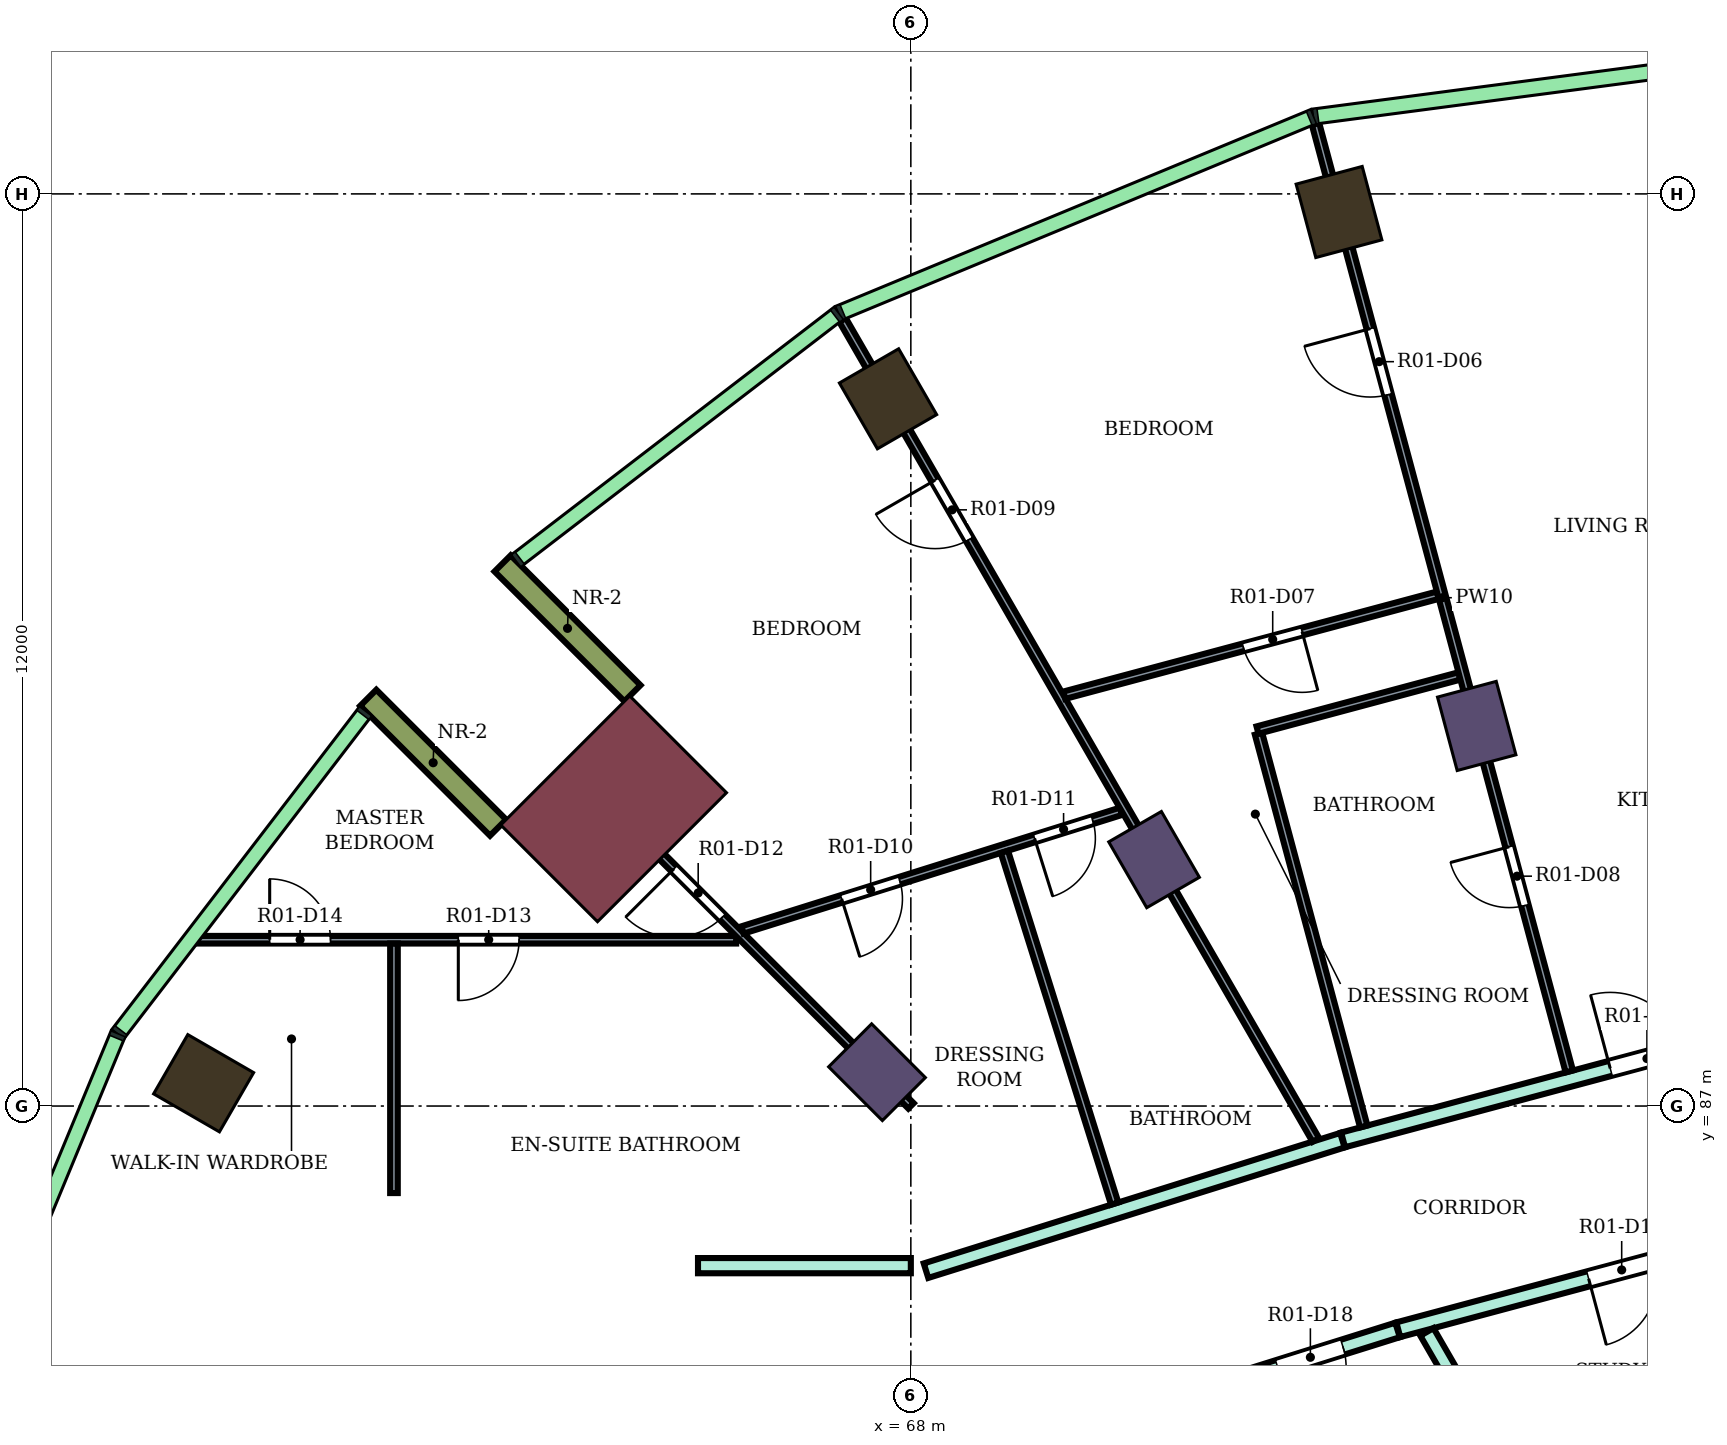
"""IFC4 building model, lengths in metres.
Left out: names, types, materials, properties, quantities, classifications, styles, units other than length and angle.
Written with IfcOpenShell. Run it as: python <this file> out.ifc"""

import sys

from ifc_helpers import new_model, si_unit, direction, frame, frame_2d, origin, origin_2d, place, context, subcontext, project, spatial, rectangle, extrude, element, fill, save


model = new_model("IFC4")
c1 = context("Model", 3, precision=1e-05, world=origin(), true_north=direction((0.0, 1.0)))
c2 = subcontext(c1, "Body", "Model", "MODEL_VIEW")
j1 = project(units=[si_unit("LENGTHUNIT", "METRE"), si_unit("PLANEANGLEUNIT", "RADIAN")], contexts=[c1])
p1 = place(None, origin())
s1 = spatial("IfcSite", under=j1, at=p1, CompositionType="ELEMENT")
p2 = place(p1, origin())
s2 = spatial("IfcBuilding", under=s1, at=p2, CompositionType="ELEMENT")
p3 = place(p2, frame((0.0, 0.0, 161.8)))
s3 = spatial("IfcBuildingStorey", under=s2, at=p3, CompositionType="ELEMENT", Elevation=161.8)
for number, where, z_axis, x_axis in (
    (1, (73.633, 98.762, 0.0), (0.0, 0.0, 1.0), (-0.259, 0.966, 0.0)),
    (2, (67.7, 96.304, 0.0), (0.0, 0.0, 1.0), (-0.5, 0.866, 0.0)),
    (3, (58.696, 87.3, 0.0), (0.0, 0.0, 1.0), (-0.866, 0.5, 0.0)),
):
    element("IfcColumn", number, at=place(p3, frame(where, z_axis=z_axis, x_axis=x_axis)), inside=s3, PredefinedType="COLUMN", context=c2, shape_type="SweptSolid", body=[
        extrude(rectangle(XDim=1.0, YDim=0.9, at=origin_2d()), origin(), (0.0, 0.0, 1.0), 4.1),
    ])
for number, where, z_axis, x_axis in (
    (4, (75.445, 92.0, 0.0), (0.0, 0.0, 1.0), (-0.259, 0.966, 0.0)),
    (5, (71.2, 90.242, 0.0), (0.0, 0.0, 1.0), (-0.5, 0.866, 0.0)),
    (6, (67.555, 87.445, 0.0), (0.0, 0.0, 1.0), (-0.707, 0.707, 0.0)),
):
    element("IfcColumn", number, at=place(p3, frame(where, z_axis=z_axis, x_axis=x_axis)), inside=s3, PredefinedType="COLUMN", context=c2, shape_type="SweptSolid", body=[
        extrude(rectangle(XDim=1.0, YDim=0.8, at=origin_2d()), origin(), (0.0, 0.0, 1.0), 4.1),
    ])
p4 = place(p3, frame((64.09, 90.91, 0.0), z_axis=(0.0, 0.0, 1.0), x_axis=(-0.707106781187, 0.707106781187, 0.0)))
e7 = element("IfcColumn", 7, at=p4, inside=s3, PredefinedType="COLUMN", context=c2, shape_type="SweptSolid", body=[
    extrude(rectangle(XDim=1.8, YDim=2.4, at=origin_2d()), origin(), (0.0, 0.0, 1.0), 4.1),
])
for number, where, z_axis, x_axis in (
    (8, (64.338, 92.43, 0.0), (0.0, 0.0, 1.0), (-0.707, 0.707, 0.0)),
    (9, (62.57, 90.662, 0.0), (0.0, 0.0, 1.0), (-0.707, 0.707, 0.0)),
):
    element("IfcWall", number, at=place(p3, frame(where, z_axis=z_axis, x_axis=x_axis)), inside=s3, PredefinedType="NOTDEFINED", context=c2, shape_type="SweptSolid", body=[
        extrude(rectangle(XDim=2.416, YDim=0.3, at=frame_2d((1.208, 0.0))), origin(), (0.0, 0.0, 1.0), 4.1),
    ])
p5 = place(p3, frame((65.2, 84.9, 0.0), z_axis=(0.0, 0.0, 1.0), x_axis=(1.0, 0.0, 0.0)))
e10 = element("IfcWall", 10, at=p5, inside=s3, PredefinedType="PARTITIONING", context=c2, shape_type="SweptSolid", body=[
    extrude(rectangle(XDim=2.8, YDim=0.2, at=frame_2d((1.4, 0.0))), origin(), (0.0, 0.0, 1.0), 3.65),
])
p6 = place(p3, frame((68.2, 84.834, 0.0), z_axis=(0.0, 0.0, 1.0), x_axis=(0.954272398161, 0.298938438661, 0.0)))
e11 = element("IfcWall", 11, at=p6, inside=s3, PredefinedType="PARTITIONING", context=c2, shape_type="SweptSolid", body=[
    extrude(rectangle(XDim=5.74, YDim=0.2, at=frame_2d((2.87, 0.0))), origin(), (0.0, 0.0, 1.0), 3.65),
])
p7 = place(p3, frame((72.1, 83.332, 0.0), z_axis=(0.0, 0.0, 1.0), x_axis=(0.954233106619, 0.299063836383, 0.0)))
e12 = element("IfcWall", 12, at=p7, inside=s3, PredefinedType="PARTITIONING", context=c2, shape_type="SweptSolid", body=[
    extrude(rectangle(XDim=2.414, YDim=0.2, at=frame_2d((1.207, 0.0))), origin(), (0.0, 0.0, 1.0), 3.65),
])
p8 = place(p7, frame((0.762, 0.0, 0.0)))
e13 = element("IfcOpeningElement", 13, at=p8, cuts=e12, PredefinedType="OPENING", context=c2, shape_type="SweptSolid", body=[
    extrude(rectangle(XDim=0.9, YDim=2.1, at=frame_2d((0.45, 1.05))), frame((0.0, 0.11, 0.0), z_axis=(0.0, -1.0, 0.0), x_axis=(1.0, 0.0, 0.0)), (0.0, 0.0, 1.0), 0.22),
])
p9 = place(p3, frame((73.687, 86.554, 0.0), z_axis=(0.0, 0.0, 1.0), x_axis=(0.965999420828, 0.258544230182, 0.0)))
e14 = element("IfcWall", 14, at=p9, inside=s3, PredefinedType="PARTITIONING", context=c2, shape_type="SweptSolid", body=[
    extrude(rectangle(XDim=6.446, YDim=0.2, at=frame_2d((3.223, 0.0))), origin(), (0.0, 0.0, 1.0), 3.65),
])
p10 = place(p9, frame((3.638, 0.0, 0.0)))
e15 = element("IfcOpeningElement", 15, at=p10, cuts=e14, PredefinedType="OPENING", context=c2, shape_type="SweptSolid", body=[
    extrude(rectangle(XDim=1.0, YDim=2.1, at=frame_2d((0.5, 1.05))), frame((0.0, 0.11, 0.0), z_axis=(0.0, -1.0, 0.0), x_axis=(1.0, 0.0, 0.0)), (0.0, 0.0, 1.0), 0.22),
])
p11 = place(p3, frame((74.413, 84.057, 0.0), z_axis=(0.0, 0.0, 1.0), x_axis=(0.965972135939, 0.258646153246, 0.0)))
e16 = element("IfcWall", 16, at=p11, inside=s3, PredefinedType="PARTITIONING", context=c2, shape_type="SweptSolid", body=[
    extrude(rectangle(XDim=5.654, YDim=0.2, at=frame_2d((2.827, 0.0))), origin(), (0.0, 0.0, 1.0), 3.65),
])
p12 = place(p11, frame((2.593, 0.0, 0.0)))
e17 = element("IfcOpeningElement", 17, at=p12, cuts=e16, PredefinedType="OPENING", context=c2, shape_type="SweptSolid", body=[
    extrude(rectangle(XDim=0.9, YDim=2.1, at=frame_2d((0.45, 1.05))), frame((0.0, 0.11, 0.0), z_axis=(0.0, -1.0, 0.0), x_axis=(1.0, 0.0, 0.0)), (0.0, 0.0, 1.0), 0.22),
])
p13 = place(p3, frame((74.79, 84.028, 0.0), z_axis=(0.0, 0.0, 1.0), x_axis=(0.499905962189, -0.866079689733, 0.0)))
e18 = element("IfcWall", 18, at=p13, inside=s3, PredefinedType="PARTITIONING", context=c2, shape_type="SweptSolid", body=[
    extrude(rectangle(XDim=2.726, YDim=0.2, at=frame_2d((1.363, 0.0))), origin(), (0.0, 0.0, 1.0), 3.65),
])
p14 = place(p3, frame((58.6, 89.188, 0.0), z_axis=(0.0, 0.0, 1.0), x_axis=(1.0, 0.0, 0.0)))
e19 = element("IfcWall", 19, at=p14, inside=s3, PredefinedType="PARTITIONING", context=c2, shape_type="SweptSolid", body=[
    extrude(rectangle(XDim=7.102, YDim=0.1, at=frame_2d((3.551, 0.0))), origin(), (0.0, 0.0, 1.0), 3.65),
])
p15 = place(p14, frame((3.447, 0.0, 0.0)))
e20 = element("IfcOpeningElement", 20, at=p15, cuts=e19, PredefinedType="OPENING", context=c2, shape_type="SweptSolid", body=[
    extrude(rectangle(XDim=0.8, YDim=2.1, at=frame_2d((0.4, 1.05))), frame((0.0, 0.06, 0.0), z_axis=(0.0, -1.0, 0.0), x_axis=(1.0, 0.0, 0.0)), (0.0, 0.0, 1.0), 0.12),
])
p16 = place(p14, frame((0.965, 0.0, 0.0)))
e21 = element("IfcOpeningElement", 21, at=p16, cuts=e19, PredefinedType="OPENING", context=c2, shape_type="SweptSolid", body=[
    extrude(rectangle(XDim=0.8, YDim=2.1, at=frame_2d((0.4, 1.05))), frame((0.0, 0.06, 0.0), z_axis=(0.0, -1.0, 0.0), x_axis=(1.0, 0.0, 0.0)), (0.0, 0.0, 1.0), 0.12),
])
p17 = place(p3, frame((61.2, 85.855, 0.0), z_axis=(0.0, 0.0, 1.0), x_axis=(0.0, 1.0, 0.0)))
e22 = element("IfcWall", 22, at=p17, inside=s3, PredefinedType="PARTITIONING", context=c2, shape_type="SweptSolid", body=[
    extrude(rectangle(XDim=3.283, YDim=0.1, at=frame_2d((1.642, 0.0))), origin(), (0.0, 0.0, 1.0), 3.65),
])
p18 = place(p3, frame((63.598, 91.408, 0.0), z_axis=(0.0, 0.0, 1.0), x_axis=(0.70693039891, -0.707283119477, 0.0)))
e23 = element("IfcWall", 23, at=p18, inside=s3, PredefinedType="PARTITIONING", context=c2, shape_type="SweptSolid", body=[
    extrude(rectangle(XDim=6.229, YDim=0.1, at=frame_2d((3.115, 0.0))), origin(), (0.0, 0.0, 1.0), 3.65),
])
p19 = place(p18, frame((1.819, 0.0, 0.0)))
e24 = element("IfcOpeningElement", 24, at=p19, cuts=e23, PredefinedType="OPENING", context=c2, shape_type="SweptSolid", body=[
    extrude(rectangle(XDim=0.9, YDim=2.1, at=frame_2d((0.45, 1.05))), frame((0.0, 0.06, 0.0), z_axis=(0.0, -1.0, 0.0), x_axis=(1.0, 0.0, 0.0)), (0.0, 0.0, 1.0), 0.12),
])
p20 = place(p3, frame((65.785, 89.316, 0.0), z_axis=(0.0, 0.0, 1.0), x_axis=(0.954187348418, 0.299209799504, 0.0)))
e25 = element("IfcWall", 25, at=p20, inside=s3, PredefinedType="PARTITIONING", context=c2, shape_type="SweptSolid", body=[
    extrude(rectangle(XDim=5.219, YDim=0.1, at=frame_2d((2.609, 0.0))), origin(), (0.0, 0.0, 1.0), 3.65),
])
p21 = place(p20, frame((1.367, 0.0, 0.0)))
e26 = element("IfcOpeningElement", 26, at=p21, cuts=e25, PredefinedType="OPENING", context=c2, shape_type="SweptSolid", body=[
    extrude(rectangle(XDim=0.8, YDim=2.1, at=frame_2d((0.4, 1.05))), frame((0.0, 0.06, 0.0), z_axis=(0.0, -1.0, 0.0), x_axis=(1.0, 0.0, 0.0)), (0.0, 0.0, 1.0), 0.12),
])
p22 = place(p20, frame((4.027, 0.0, 0.0)))
e27 = element("IfcOpeningElement", 27, at=p22, cuts=e25, PredefinedType="OPENING", context=c2, shape_type="SweptSolid", body=[
    extrude(rectangle(XDim=0.8, YDim=2.1, at=frame_2d((0.4, 1.05))), frame((0.0, 0.06, 0.0), z_axis=(0.0, -1.0, 0.0), x_axis=(1.0, 0.0, 0.0)), (0.0, 0.0, 1.0), 0.12),
])
p23 = place(p3, frame((67.101, 97.342, 0.0), z_axis=(0.0, 0.0, 1.0), x_axis=(0.499929451451, -0.866066131177, 0.0)))
e28 = element("IfcWall", 28, at=p23, inside=s3, PredefinedType="PARTITIONING", context=c2, shape_type="SweptSolid", body=[
    extrude(rectangle(XDim=12.456, YDim=0.1, at=frame_2d((6.228, 0.0))), origin(), (0.0, 0.0, 1.0), 3.65),
])
p24 = place(p23, frame((2.434, 0.0, 0.0)))
e29 = element("IfcOpeningElement", 29, at=p24, cuts=e28, PredefinedType="OPENING", context=c2, shape_type="SweptSolid", body=[
    extrude(rectangle(XDim=0.9, YDim=2.1, at=frame_2d((0.45, 1.05))), frame((0.0, 0.06, 0.0), z_axis=(0.0, -1.0, 0.0), x_axis=(1.0, 0.0, 0.0)), (0.0, 0.0, 1.0), 0.12),
])
p25 = place(p3, frame((69.231, 90.344, 0.0), z_axis=(0.0, 0.0, 1.0), x_axis=(0.299203490128, -0.954189326861, 0.0)))
e30 = element("IfcWall", 30, at=p25, inside=s3, PredefinedType="PARTITIONING", context=c2, shape_type="SweptSolid", body=[
    extrude(rectangle(XDim=4.85, YDim=0.1, at=frame_2d((2.425, 0.0))), origin(), (0.0, 0.0, 1.0), 3.65),
])
p26 = place(p3, frame((70.019, 92.405, 0.0), z_axis=(0.0, 0.0, 1.0), x_axis=(0.965982744428, 0.258606530209, 0.0)))
e31 = element("IfcWall", 31, at=p26, inside=s3, PredefinedType="PARTITIONING", context=c2, shape_type="SweptSolid", body=[
    extrude(rectangle(XDim=5.087, YDim=0.1, at=frame_2d((2.543, 0.0))), origin(), (0.0, 0.0, 1.0), 3.65),
])
p27 = place(p26, frame((2.438, 0.0, 0.0)))
e32 = element("IfcOpeningElement", 32, at=p27, cuts=e31, PredefinedType="OPENING", context=c2, shape_type="SweptSolid", body=[
    extrude(rectangle(XDim=0.8, YDim=2.1, at=frame_2d((0.4, 1.05))), frame((0.0, 0.06, 0.0), z_axis=(0.0, -1.0, 0.0), x_axis=(1.0, 0.0, 0.0)), (0.0, 0.0, 1.0), 0.12),
])
p28 = place(p3, frame((72.574, 91.898, 0.0), z_axis=(0.0, 0.0, 1.0), x_axis=(0.258739127054, -0.965947236722, 0.0)))
e33 = element("IfcWall", 33, at=p28, inside=s3, PredefinedType="PARTITIONING", context=c2, shape_type="SweptSolid", body=[
    extrude(rectangle(XDim=5.349, YDim=0.1, at=frame_2d((2.675, 0.0))), origin(), (0.0, 0.0, 1.0), 3.65),
])
p29 = place(p3, frame((72.561, 91.946, 0.0), z_axis=(0.0, 0.0, 1.0), x_axis=(0.96591000446, 0.258878085754, 0.0)))
e34 = element("IfcWall", 34, at=p29, inside=s3, PredefinedType="PARTITIONING", context=c2, shape_type="SweptSolid", body=[
    extrude(rectangle(XDim=2.75, YDim=0.1, at=frame_2d((1.375, 0.0))), origin(), (0.0, 0.0, 1.0), 3.65),
])
p30 = place(p3, frame((73.324, 99.92, 0.0), z_axis=(0.0, 0.0, 1.0), x_axis=(0.258710550884, -0.965954890697, 0.0)))
e35 = element("IfcWall", 35, at=p30, inside=s3, PredefinedType="PARTITIONING", context=c2, shape_type="SweptSolid", body=[
    extrude(rectangle(XDim=12.904, YDim=0.1, at=frame_2d((6.452, 0.0))), origin(), (0.0, 0.0, 1.0), 3.65),
])
p31 = place(p30, frame((2.787, 0.0, 0.0)))
e36 = element("IfcOpeningElement", 36, at=p31, cuts=e35, PredefinedType="OPENING", context=c2, shape_type="SweptSolid", body=[
    extrude(rectangle(XDim=0.9, YDim=2.1, at=frame_2d((0.45, 1.05))), frame((0.0, 0.06, 0.0), z_axis=(0.0, -1.0, 0.0), x_axis=(1.0, 0.0, 0.0)), (0.0, 0.0, 1.0), 0.12),
])
p32 = place(p30, frame((9.844, 0.0, 0.0)))
e37 = element("IfcOpeningElement", 37, at=p32, cuts=e35, PredefinedType="OPENING", context=c2, shape_type="SweptSolid", body=[
    extrude(rectangle(XDim=0.8, YDim=2.1, at=frame_2d((0.4, 1.05))), frame((0.0, 0.06, 0.0), z_axis=(0.0, -1.0, 0.0), x_axis=(1.0, 0.0, 0.0)), (0.0, 0.0, 1.0), 0.12),
])
p33 = place(p10, origin())
e38 = element("IfcDoor", 38, at=p33, inside=s3, OperationType="SINGLE_SWING_LEFT", PredefinedType="DOOR", context=c2, shape_type="SweptSolid", body=[
    extrude(rectangle(XDim=1.0, YDim=2.1, at=frame_2d((0.5, 1.05))), frame((0.0, 0.025, 0.0), z_axis=(0.0, -1.0, 0.0), x_axis=(1.0, 0.0, 0.0)), (0.0, 0.0, 1.0), 0.05),
])
fill(e15, e38)
p34 = place(p31, frame((0.9, 0.0, 0.0), z_axis=(0.0, 0.0, 1.0), x_axis=(-1.0, 0.0, 0.0)))
e39 = element("IfcDoor", 39, at=p34, inside=s3, OperationType="SINGLE_SWING_RIGHT", PredefinedType="DOOR", context=c2, shape_type="SweptSolid", body=[
    extrude(rectangle(XDim=0.9, YDim=2.1, at=frame_2d((0.45, 1.05))), frame((0.0, 0.025, 0.0), z_axis=(0.0, -1.0, 0.0), x_axis=(1.0, 0.0, 0.0)), (0.0, 0.0, 1.0), 0.05),
])
fill(e36, e39)
p35 = place(p27, frame((0.8, 0.0, 0.0), z_axis=(0.0, 0.0, 1.0), x_axis=(-1.0, 0.0, 0.0)))
e40 = element("IfcDoor", 40, at=p35, inside=s3, OperationType="SINGLE_SWING_LEFT", PredefinedType="DOOR", context=c2, shape_type="SweptSolid", body=[
    extrude(rectangle(XDim=0.8, YDim=2.1, at=frame_2d((0.4, 1.05))), frame((0.0, 0.025, 0.0), z_axis=(0.0, -1.0, 0.0), x_axis=(1.0, 0.0, 0.0)), (0.0, 0.0, 1.0), 0.05),
])
fill(e32, e40)
p36 = place(p32, frame((0.8, 0.0, 0.0), z_axis=(0.0, 0.0, 1.0), x_axis=(-1.0, 0.0, 0.0)))
e41 = element("IfcDoor", 41, at=p36, inside=s3, OperationType="SINGLE_SWING_RIGHT", PredefinedType="DOOR", context=c2, shape_type="SweptSolid", body=[
    extrude(rectangle(XDim=0.8, YDim=2.1, at=frame_2d((0.4, 1.05))), frame((0.0, 0.025, 0.0), z_axis=(0.0, -1.0, 0.0), x_axis=(1.0, 0.0, 0.0)), (0.0, 0.0, 1.0), 0.05),
])
fill(e37, e41)
p37 = place(p24, frame((0.9, 0.0, 0.0), z_axis=(0.0, 0.0, 1.0), x_axis=(-1.0, 0.0, 0.0)))
e42 = element("IfcDoor", 42, at=p37, inside=s3, OperationType="SINGLE_SWING_RIGHT", PredefinedType="DOOR", context=c2, shape_type="SweptSolid", body=[
    extrude(rectangle(XDim=0.9, YDim=2.1, at=frame_2d((0.45, 1.05))), frame((0.0, 0.025, 0.0), z_axis=(0.0, -1.0, 0.0), x_axis=(1.0, 0.0, 0.0)), (0.0, 0.0, 1.0), 0.05),
])
fill(e29, e42)
p38 = place(p21, frame((0.8, 0.0, 0.0), z_axis=(0.0, 0.0, 1.0), x_axis=(-1.0, 0.0, 0.0)))
e43 = element("IfcDoor", 43, at=p38, inside=s3, OperationType="SINGLE_SWING_RIGHT", PredefinedType="DOOR", context=c2, shape_type="SweptSolid", body=[
    extrude(rectangle(XDim=0.8, YDim=2.1, at=frame_2d((0.4, 1.05))), frame((0.0, 0.025, 0.0), z_axis=(0.0, -1.0, 0.0), x_axis=(1.0, 0.0, 0.0)), (0.0, 0.0, 1.0), 0.05),
])
fill(e26, e43)
p39 = place(p22, frame((0.8, 0.0, 0.0), z_axis=(0.0, 0.0, 1.0), x_axis=(-1.0, 0.0, 0.0)))
e44 = element("IfcDoor", 44, at=p39, inside=s3, OperationType="SINGLE_SWING_RIGHT", PredefinedType="DOOR", context=c2, shape_type="SweptSolid", body=[
    extrude(rectangle(XDim=0.8, YDim=2.1, at=frame_2d((0.4, 1.05))), frame((0.0, 0.025, 0.0), z_axis=(0.0, -1.0, 0.0), x_axis=(1.0, 0.0, 0.0)), (0.0, 0.0, 1.0), 0.05),
])
fill(e27, e44)
p40 = place(p19, frame((0.9, 0.0, 0.0), z_axis=(0.0, 0.0, 1.0), x_axis=(-1.0, 0.0, 0.0)))
e45 = element("IfcDoor", 45, at=p40, inside=s3, OperationType="SINGLE_SWING_RIGHT", PredefinedType="DOOR", context=c2, shape_type="SweptSolid", body=[
    extrude(rectangle(XDim=0.9, YDim=2.1, at=frame_2d((0.45, 1.05))), frame((0.0, 0.025, 0.0), z_axis=(0.0, -1.0, 0.0), x_axis=(1.0, 0.0, 0.0)), (0.0, 0.0, 1.0), 0.05),
])
fill(e24, e45)
p41 = place(p15, frame((0.8, 0.0, 0.0), z_axis=(0.0, 0.0, 1.0), x_axis=(-1.0, 0.0, 0.0)))
e46 = element("IfcDoor", 46, at=p41, inside=s3, OperationType="SINGLE_SWING_RIGHT", PredefinedType="DOOR", context=c2, shape_type="SweptSolid", body=[
    extrude(rectangle(XDim=0.8, YDim=2.1, at=frame_2d((0.4, 1.05))), frame((0.0, 0.025, 0.0), z_axis=(0.0, -1.0, 0.0), x_axis=(1.0, 0.0, 0.0)), (0.0, 0.0, 1.0), 0.05),
])
fill(e20, e46)
p42 = place(p16, origin())
e47 = element("IfcDoor", 47, at=p42, inside=s3, OperationType="SINGLE_SWING_LEFT", PredefinedType="DOOR", context=c2, shape_type="SweptSolid", body=[
    extrude(rectangle(XDim=0.8, YDim=2.1, at=frame_2d((0.4, 1.05))), frame((0.0, 0.025, 0.0), z_axis=(0.0, -1.0, 0.0), x_axis=(1.0, 0.0, 0.0)), (0.0, 0.0, 1.0), 0.05),
])
fill(e21, e47)
p43 = place(p12, frame((0.9, 0.0, 0.0), z_axis=(0.0, 0.0, 1.0), x_axis=(-1.0, 0.0, 0.0)))
e48 = element("IfcDoor", 48, at=p43, inside=s3, OperationType="SINGLE_SWING_RIGHT", PredefinedType="DOOR", context=c2, shape_type="SweptSolid", body=[
    extrude(rectangle(XDim=0.9, YDim=2.1, at=frame_2d((0.45, 1.05))), frame((0.0, 0.025, 0.0), z_axis=(0.0, -1.0, 0.0), x_axis=(1.0, 0.0, 0.0)), (0.0, 0.0, 1.0), 0.05),
])
fill(e17, e48)
p44 = place(p8, frame((0.9, 0.0, 0.0), z_axis=(0.0, 0.0, 1.0), x_axis=(-1.0, 0.0, 0.0)))
e49 = element("IfcDoor", 49, at=p44, inside=s3, OperationType="SINGLE_SWING_RIGHT", PredefinedType="DOOR", context=c2, shape_type="SweptSolid", body=[
    extrude(rectangle(XDim=0.9, YDim=2.1, at=frame_2d((0.45, 1.05))), frame((0.0, 0.025, 0.0), z_axis=(0.0, -1.0, 0.0), x_axis=(1.0, 0.0, 0.0)), (0.0, 0.0, 1.0), 0.05),
])
fill(e13, e49)
save(model, sys.argv[1])
